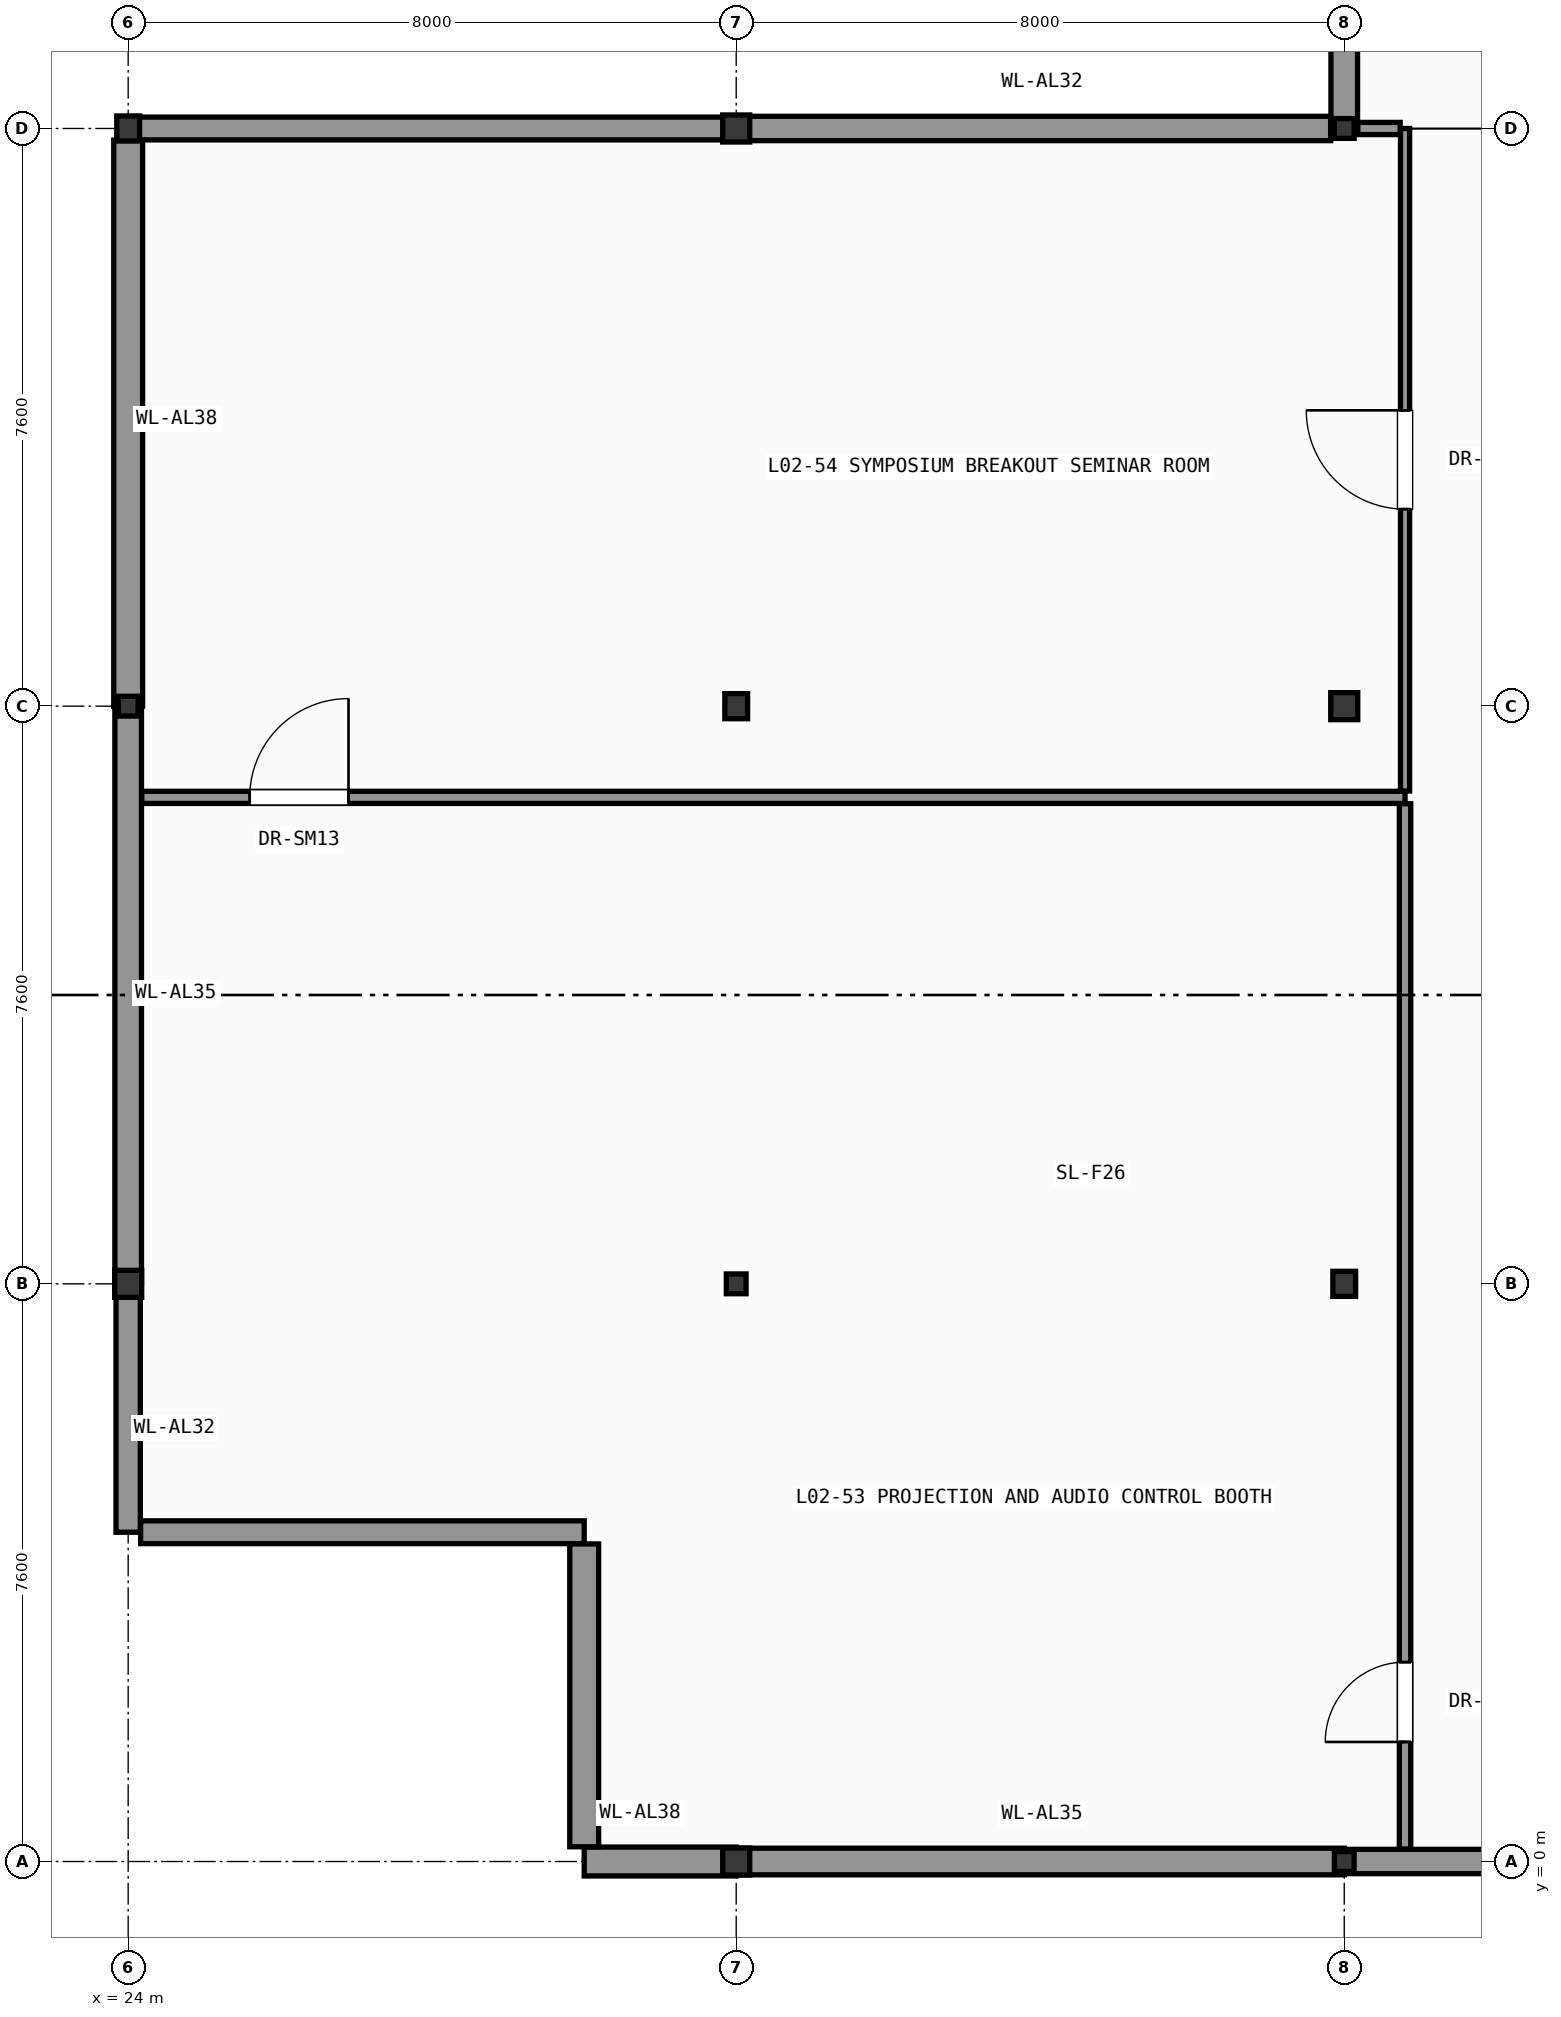
"""IFC4 building model, lengths in metres.
Left out: names, types, materials, properties, quantities, classifications, styles, units other than length and angle.
Written with IfcOpenShell. Run it as: python <this file> out.ifc"""

import sys

from ifc_helpers import new_model, si_unit, direction, frame, frame_2d, origin, origin_2d, place, context, subcontext, project, spatial, rectangle, hollow_rectangle, hollow_circle, i_section, extrude, element, fill, save


model = new_model("IFC4")
c1 = context("Model", 3, precision=1e-05, world=origin(), true_north=direction((0.0, 1.0)))
c2 = subcontext(c1, "Body", "Model", "MODEL_VIEW")
j1 = project(units=[si_unit("LENGTHUNIT", "METRE"), si_unit("PLANEANGLEUNIT", "RADIAN")], contexts=[c1])
p1 = place(None, origin())
s1 = spatial("IfcSite", under=j1, at=p1, CompositionType="ELEMENT")
p2 = place(p1, origin())
s2 = spatial("IfcBuilding", under=s1, at=p2, CompositionType="ELEMENT")
p3 = place(p2, frame((0.0, 0.0, 7.8)))
s3 = spatial("IfcBuildingStorey", under=s2, at=p3, CompositionType="ELEMENT", Elevation=7.8)
p4 = place(p3, frame((24.0, 7.6, 0.0), z_axis=(0.0, 0.0, 1.0), x_axis=(1.0, 0.0, 0.0)))
e1 = element("IfcColumn", 1, at=p4, inside=s3, PredefinedType="COLUMN", context=c2, shape_type="SweptSolid", body=[
    extrude(hollow_circle(Radius=0.178, WallThickness=0.016, at=origin_2d()), origin(), (0.0, 0.0, 1.0), 5.4),
])
p5 = place(p3, frame((24.0, 15.2, 0.0), z_axis=(0.0, 0.0, 1.0), x_axis=(1.0, 0.0, 0.0)))
e2 = element("IfcColumn", 2, at=p5, inside=s3, PredefinedType="COLUMN", context=c2, shape_type="SweptSolid", body=[
    extrude(hollow_rectangle(XDim=0.26, YDim=0.26, WallThickness=0.012, InnerFilletRadius=0.012, OuterFilletRadius=0.025, at=origin_2d()), origin(), (0.0, 0.0, 1.0), 5.4),
])
p6 = place(p3, frame((24.0, 22.8, 0.0), z_axis=(0.0, 0.0, 1.0), x_axis=(1.0, 0.0, 0.0)))
e3 = element("IfcColumn", 3, at=p6, inside=s3, PredefinedType="COLUMN", context=c2, shape_type="SweptSolid", body=[
    extrude(i_section(OverallWidth=0.3, OverallDepth=0.33, WebThickness=0.01, FlangeThickness=0.017, FilletRadius=0.027, at=origin_2d()), origin(), (0.0, 0.0, 1.0), 5.4),
])
p7 = place(p3, frame((32.0, 0.0, 0.0), z_axis=(0.0, 0.0, 1.0), x_axis=(1.0, 0.0, 0.0)))
e4 = element("IfcColumn", 4, at=p7, inside=s3, PredefinedType="COLUMN", context=c2, shape_type="SweptSolid", body=[
    extrude(hollow_circle(Radius=0.178, WallThickness=0.016, at=origin_2d()), origin(), (0.0, 0.0, 1.0), 5.4),
])
p8 = place(p3, frame((32.0, 7.6, 0.0), z_axis=(0.0, 0.0, 1.0), x_axis=(1.0, 0.0, 0.0)))
e5 = element("IfcColumn", 5, at=p8, inside=s3, PredefinedType="COLUMN", context=c2, shape_type="SweptSolid", body=[
    extrude(hollow_rectangle(XDim=0.26, YDim=0.26, WallThickness=0.012, InnerFilletRadius=0.012, OuterFilletRadius=0.025, at=origin_2d()), origin(), (0.0, 0.0, 1.0), 5.4),
])
p9 = place(p3, frame((32.0, 15.2, 0.0), z_axis=(0.0, 0.0, 1.0), x_axis=(1.0, 0.0, 0.0)))
e6 = element("IfcColumn", 6, at=p9, inside=s3, PredefinedType="COLUMN", context=c2, shape_type="SweptSolid", body=[
    extrude(i_section(OverallWidth=0.3, OverallDepth=0.33, WebThickness=0.01, FlangeThickness=0.017, FilletRadius=0.027, at=origin_2d()), origin(), (0.0, 0.0, 1.0), 5.4),
])
p10 = place(p3, frame((32.0, 22.8, 0.0), z_axis=(0.0, 0.0, 1.0), x_axis=(1.0, 0.0, 0.0)))
e7 = element("IfcColumn", 7, at=p10, inside=s3, PredefinedType="COLUMN", context=c2, shape_type="SweptSolid", body=[
    extrude(hollow_circle(Radius=0.178, WallThickness=0.016, at=origin_2d()), origin(), (0.0, 0.0, 1.0), 5.4),
])
p11 = place(p3, frame((40.0, 0.0, 0.0), z_axis=(0.0, 0.0, 1.0), x_axis=(1.0, 0.0, 0.0)))
e8 = element("IfcColumn", 8, at=p11, inside=s3, PredefinedType="COLUMN", context=c2, shape_type="SweptSolid", body=[
    extrude(hollow_rectangle(XDim=0.26, YDim=0.26, WallThickness=0.012, InnerFilletRadius=0.012, OuterFilletRadius=0.025, at=origin_2d()), origin(), (0.0, 0.0, 1.0), 5.4),
])
p12 = place(p3, frame((40.0, 7.6, 0.0), z_axis=(0.0, 0.0, 1.0), x_axis=(1.0, 0.0, 0.0)))
e9 = element("IfcColumn", 9, at=p12, inside=s3, PredefinedType="COLUMN", context=c2, shape_type="SweptSolid", body=[
    extrude(i_section(OverallWidth=0.3, OverallDepth=0.33, WebThickness=0.01, FlangeThickness=0.017, FilletRadius=0.027, at=origin_2d()), origin(), (0.0, 0.0, 1.0), 5.4),
])
p13 = place(p3, frame((40.0, 15.2, 0.0), z_axis=(0.0, 0.0, 1.0), x_axis=(1.0, 0.0, 0.0)))
e10 = element("IfcColumn", 10, at=p13, inside=s3, PredefinedType="COLUMN", context=c2, shape_type="SweptSolid", body=[
    extrude(hollow_circle(Radius=0.178, WallThickness=0.016, at=origin_2d()), origin(), (0.0, 0.0, 1.0), 5.4),
])
p14 = place(p3, frame((40.0, 22.8, 0.0), z_axis=(0.0, 0.0, 1.0), x_axis=(1.0, 0.0, 0.0)))
e11 = element("IfcColumn", 11, at=p14, inside=s3, PredefinedType="COLUMN", context=c2, shape_type="SweptSolid", body=[
    extrude(hollow_rectangle(XDim=0.26, YDim=0.26, WallThickness=0.012, InnerFilletRadius=0.012, OuterFilletRadius=0.025, at=origin_2d()), origin(), (0.0, 0.0, 1.0), 5.4),
])
p15 = place(p3, frame((32.0, 0.0, 0.0), z_axis=(0.0, 0.0, 1.0), x_axis=(-1.0, 0.0, 0.0)))
e12 = element("IfcWall", 12, at=p15, inside=s3, PredefinedType="SOLIDWALL", context=c2, shape_type="SweptSolid", body=[
    extrude(rectangle(XDim=2.0, YDim=0.38, at=frame_2d((1.0, 0.0))), origin(), (0.0, 0.0, 1.0), 5.15),
])
p16 = place(p3, frame((40.0, 0.0, 0.0), z_axis=(0.0, 0.0, 1.0), x_axis=(-1.0, 0.0, 0.0)))
e13 = element("IfcWall", 13, at=p16, inside=s3, PredefinedType="SOLIDWALL", context=c2, shape_type="SweptSolid", body=[
    extrude(rectangle(XDim=8.0, YDim=0.35, at=frame_2d((4.0, 0.0))), origin(), (0.0, 0.0, 1.0), 4.745),
])
p17 = place(p3, frame((48.0, 0.0, 0.0), z_axis=(0.0, 0.0, 1.0), x_axis=(-1.0, 0.0, 0.0)))
e14 = element("IfcWall", 14, at=p17, inside=s3, PredefinedType="SOLIDWALL", context=c2, shape_type="SweptSolid", body=[
    extrude(rectangle(XDim=8.0, YDim=0.32, at=frame_2d((4.0, 0.0))), origin(), (0.0, 0.0, 1.0), 4.745),
])
p18 = place(p17, frame((2.017, 0.0, 0.95)))
e15 = element("IfcOpeningElement", 15, at=p18, cuts=e14, PredefinedType="OPENING", context=c2, shape_type="SweptSolid", body=[
    extrude(rectangle(XDim=1.3, YDim=2.3, at=frame_2d((0.65, 1.15))), frame((0.0, 0.17, 0.0), z_axis=(0.0, -1.0, 0.0), x_axis=(1.0, 0.0, 0.0)), (0.0, 0.0, 1.0), 0.34),
])
p19 = place(p17, frame((4.683, 0.0, 0.95)))
e16 = element("IfcOpeningElement", 16, at=p19, cuts=e14, PredefinedType="OPENING", context=c2, shape_type="SweptSolid", body=[
    extrude(rectangle(XDim=1.3, YDim=2.3, at=frame_2d((0.65, 1.15))), frame((0.0, 0.17, 0.0), z_axis=(0.0, -1.0, 0.0), x_axis=(1.0, 0.0, 0.0)), (0.0, 0.0, 1.0), 0.34),
])
p20 = place(p3, frame((40.0, 22.8, 0.0), z_axis=(0.0, 0.0, 1.0), x_axis=(0.0, 1.0, 0.0)))
e17 = element("IfcWall", 17, at=p20, inside=s3, PredefinedType="SOLIDWALL", context=c2, shape_type="SweptSolid", body=[
    extrude(rectangle(XDim=7.6, YDim=0.35, at=frame_2d((3.8, 0.0))), origin(), (0.0, 0.0, 1.0), 5.15),
])
p21 = place(p20, frame((2.375, 0.0, 0.95)))
e18 = element("IfcOpeningElement", 18, at=p21, cuts=e17, PredefinedType="OPENING", context=c2, shape_type="SweptSolid", body=[
    extrude(rectangle(XDim=2.85, YDim=3.8, at=frame_2d((1.425, 1.9))), frame((0.0, 0.185, 0.0), z_axis=(0.0, -1.0, 0.0), x_axis=(1.0, 0.0, 0.0)), (0.0, 0.0, 1.0), 0.37),
])
p22 = place(p3, frame((32.0, 22.8, 0.0), z_axis=(0.0, 0.0, 1.0), x_axis=(1.0, 0.0, 0.0)))
e19 = element("IfcWall", 19, at=p22, inside=s3, PredefinedType="SOLIDWALL", context=c2, shape_type="SweptSolid", body=[
    extrude(rectangle(XDim=7.821, YDim=0.32, at=frame_2d((3.911, 0.0))), origin(), (0.0, 0.0, 1.0), 4.815),
])
p23 = place(p3, frame((24.0, 22.8, 0.0), z_axis=(0.0, 0.0, 1.0), x_axis=(1.0, 0.0, 0.0)))
e20 = element("IfcWall", 20, at=p23, inside=s3, PredefinedType="SOLIDWALL", context=c2, shape_type="SweptSolid", body=[
    extrude(rectangle(XDim=8.0, YDim=0.3, at=frame_2d((4.0, 0.0))), origin(), (0.0, 0.0, 1.0), 4.855),
])
p24 = place(p3, frame((24.0, 15.2, 0.0), z_axis=(0.0, 0.0, 1.0), x_axis=(0.0, 1.0, 0.0)))
e21 = element("IfcWall", 21, at=p24, inside=s3, PredefinedType="SOLIDWALL", context=c2, shape_type="SweptSolid", body=[
    extrude(rectangle(XDim=7.446, YDim=0.38, at=frame_2d((3.723, 0.0))), origin(), (0.0, 0.0, 1.0), 4.635),
])
p25 = place(p3, frame((24.0, 7.6, 0.0), z_axis=(0.0, 0.0, 1.0), x_axis=(0.0, 1.0, 0.0)))
e22 = element("IfcWall", 22, at=p25, inside=s3, PredefinedType="SOLIDWALL", context=c2, shape_type="SweptSolid", body=[
    extrude(rectangle(XDim=7.6, YDim=0.35, at=frame_2d((3.8, 0.0))), origin(), (0.0, 0.0, 1.0), 4.635),
])
p26 = place(p3, frame((24.0, 4.332, 0.0), z_axis=(0.0, 0.0, 1.0), x_axis=(0.0, 1.0, 0.0)))
e23 = element("IfcWall", 23, at=p26, inside=s3, PredefinedType="SOLIDWALL", context=c2, shape_type="SweptSolid", body=[
    extrude(rectangle(XDim=3.268, YDim=0.32, at=frame_2d((1.634, 0.0))), origin(), (0.0, 0.0, 1.0), 5.15),
])
p27 = place(p3, frame((30.0, 4.332, 0.0), z_axis=(0.0, 0.0, 1.0), x_axis=(-1.0, 0.0, 0.0)))
e24 = element("IfcWall", 24, at=p27, inside=s3, PredefinedType="SOLIDWALL", context=c2, shape_type="SweptSolid", body=[
    extrude(rectangle(XDim=5.836, YDim=0.3, at=frame_2d((2.918, 0.0))), origin(), (0.0, 0.0, 1.0), 5.15),
])
p28 = place(p3, frame((30.0, 0.194, 0.0), z_axis=(0.0, 0.0, 1.0), x_axis=(0.0, 1.0, 0.0)))
e25 = element("IfcWall", 25, at=p28, inside=s3, PredefinedType="SOLIDWALL", context=c2, shape_type="SweptSolid", body=[
    extrude(rectangle(XDim=3.984, YDim=0.38, at=frame_2d((1.992, 0.0))), origin(), (0.0, 0.0, 1.0), 5.15),
])
p29 = place(p3, frame((24.179, 14.0, 0.0), z_axis=(0.0, 0.0, 1.0), x_axis=(1.0, 0.0, 0.0)))
e26 = element("IfcWall", 26, at=p29, inside=s3, PredefinedType="PARTITIONING", context=c2, shape_type="SweptSolid", body=[
    extrude(rectangle(XDim=16.621, YDim=0.16, at=frame_2d((8.311, 0.0))), origin(), (0.0, 0.0, 1.0), 5.15),
])
p30 = place(p29, frame((1.42, 0.0, 0.0)))
e27 = element("IfcOpeningElement", 27, at=p30, cuts=e26, PredefinedType="OPENING", context=c2, shape_type="SweptSolid", body=[
    extrude(rectangle(XDim=1.3, YDim=2.25, at=frame_2d((0.65, 1.125))), frame((0.0, 0.09, 0.0), z_axis=(0.0, -1.0, 0.0), x_axis=(1.0, 0.0, 0.0)), (0.0, 0.0, 1.0), 0.18),
])
p31 = place(p3, frame((40.8, 0.164, 0.0), z_axis=(0.0, 0.0, 1.0), x_axis=(0.0, 1.0, 0.0)))
e28 = element("IfcWall", 28, at=p31, inside=s3, PredefinedType="PARTITIONING", context=c2, shape_type="SweptSolid", body=[
    extrude(rectangle(XDim=13.752, YDim=0.15, at=frame_2d((6.876, 0.0))), origin(), (0.0, 0.0, 1.0), 5.15),
])
p32 = place(p31, frame((1.409, 0.0, 0.0)))
e29 = element("IfcOpeningElement", 29, at=p32, cuts=e28, PredefinedType="OPENING", context=c2, shape_type="SweptSolid", body=[
    extrude(rectangle(XDim=1.05, YDim=2.2, at=frame_2d((0.525, 1.1))), frame((0.0, 0.085, 0.0), z_axis=(0.0, -1.0, 0.0), x_axis=(1.0, 0.0, 0.0)), (0.0, 0.0, 1.0), 0.17),
])
p33 = place(p3, frame((40.8, 14.084, 0.0), z_axis=(0.0, 0.0, 1.0), x_axis=(0.0, 1.0, 0.0)))
e30 = element("IfcWall", 30, at=p33, inside=s3, PredefinedType="PARTITIONING", context=c2, shape_type="SweptSolid", body=[
    extrude(rectangle(XDim=8.716, YDim=0.12, at=frame_2d((4.358, 0.0))), origin(), (0.0, 0.0, 1.0), 5.15),
])
p34 = place(p33, frame((3.708, 0.0, 0.0)))
e31 = element("IfcOpeningElement", 31, at=p34, cuts=e30, PredefinedType="OPENING", context=c2, shape_type="SweptSolid", body=[
    extrude(rectangle(XDim=1.3, YDim=2.25, at=frame_2d((0.65, 1.125))), frame((0.0, 0.07, 0.0), z_axis=(0.0, -1.0, 0.0), x_axis=(1.0, 0.0, 0.0)), (0.0, 0.0, 1.0), 0.14),
])
p35 = place(p3, frame((40.179, 22.8, 0.0), z_axis=(0.0, 0.0, 1.0), x_axis=(1.0, 0.0, 0.0)))
e32 = element("IfcWall", 32, at=p35, inside=s3, PredefinedType="PARTITIONING", context=c2, shape_type="SweptSolid", body=[
    extrude(rectangle(XDim=0.557, YDim=0.16, at=frame_2d((0.279, 0.0))), origin(), (0.0, 0.0, 1.0), 4.785),
])
p36 = place(p30, origin())
e33 = element("IfcDoor", 33, at=p36, inside=s3, OperationType="SINGLE_SWING_RIGHT", PredefinedType="DOOR", context=c2, shape_type="SweptSolid", body=[
    extrude(rectangle(XDim=1.3, YDim=2.25, at=frame_2d((0.65, 1.125))), frame((0.0, 0.025, 0.0), z_axis=(0.0, -1.0, 0.0), x_axis=(1.0, 0.0, 0.0)), (0.0, 0.0, 1.0), 0.05),
])
fill(e27, e33)
p37 = place(p32, origin())
e34 = element("IfcDoor", 34, at=p37, inside=s3, OperationType="SINGLE_SWING_LEFT", PredefinedType="DOOR", context=c2, shape_type="SweptSolid", body=[
    extrude(rectangle(XDim=1.05, YDim=2.2, at=frame_2d((0.525, 1.1))), frame((0.0, 0.025, 0.0), z_axis=(0.0, -1.0, 0.0), x_axis=(1.0, 0.0, 0.0)), (0.0, 0.0, 1.0), 0.05),
])
fill(e29, e34)
p38 = place(p34, origin())
e35 = element("IfcDoor", 35, at=p38, inside=s3, OperationType="SINGLE_SWING_RIGHT", PredefinedType="DOOR", context=c2, shape_type="SweptSolid", body=[
    extrude(rectangle(XDim=1.3, YDim=2.25, at=frame_2d((0.65, 1.125))), frame((0.0, 0.025, 0.0), z_axis=(0.0, -1.0, 0.0), x_axis=(1.0, 0.0, 0.0)), (0.0, 0.0, 1.0), 0.05),
])
fill(e31, e35)
save(model, sys.argv[1])
